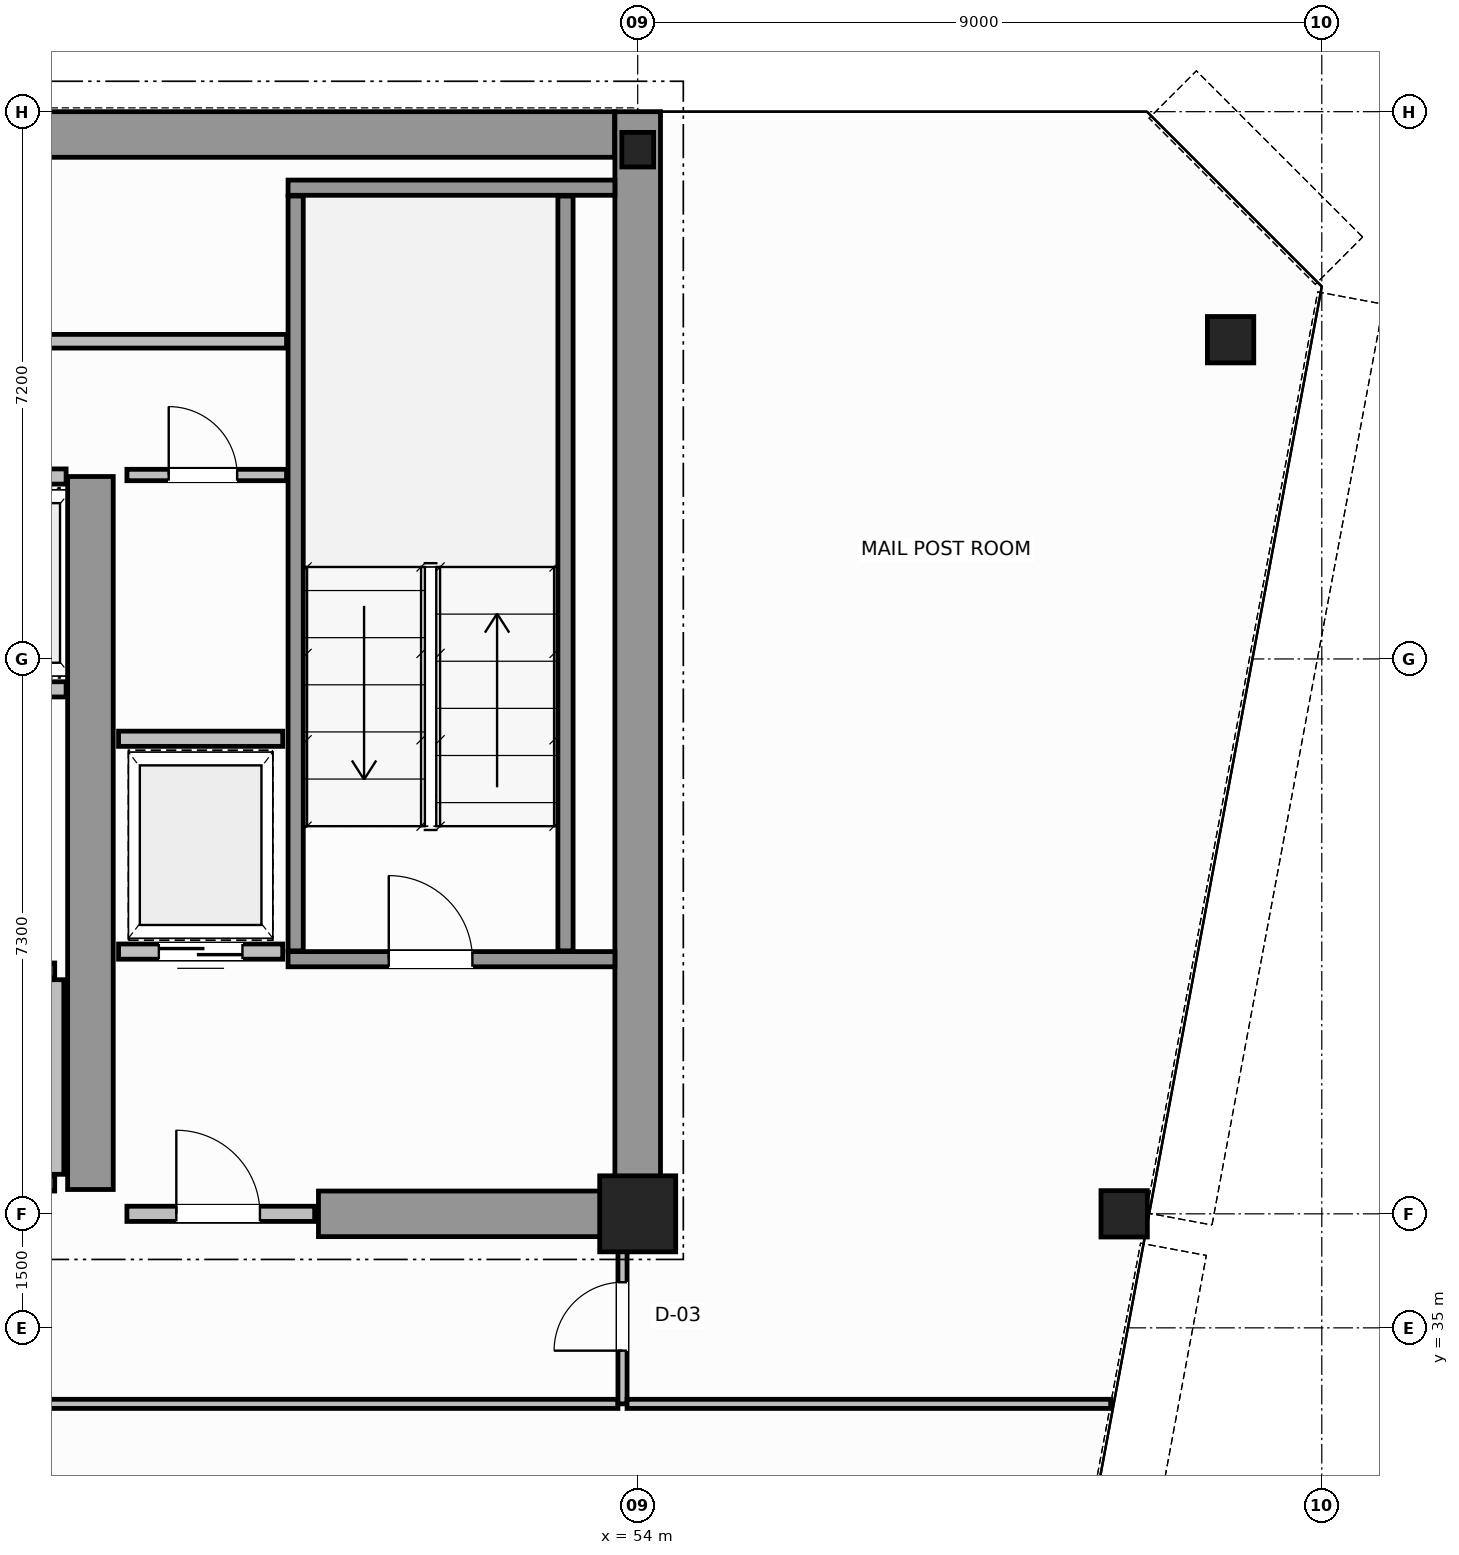
"""IFC4 building model, lengths in metres.
Left out: names, types, materials, properties, quantities, classifications, styles, units other than length and angle.
Written with IfcOpenShell. Run it as: python <this file> out.ifc"""

import sys

from ifc_helpers import new_model, si_unit, direction, frame, frame_2d, origin, origin_2d, place, context, subcontext, project, spatial, rectangle, hollow_circle, i_section, extrude, source, transform, mapped, element, fill, save


model = new_model("IFC4")
c1 = context("Model", 3, precision=1e-05, world=origin(), true_north=direction((0.0, 1.0)))
c2 = subcontext(c1, "Body", "Model", "MODEL_VIEW")
j1 = project(units=[si_unit("LENGTHUNIT", "METRE"), si_unit("PLANEANGLEUNIT", "RADIAN")], contexts=[c1])
p1 = place(None, origin())
s1 = spatial("IfcSite", under=j1, at=p1, CompositionType="ELEMENT")
p2 = place(p1, origin())
s2 = spatial("IfcBuilding", under=s1, at=p2, CompositionType="ELEMENT")
p3 = place(p2, frame((0.0, 0.0, 242.2)))
s3 = spatial("IfcBuildingStorey", under=s2, at=p3, CompositionType="ELEMENT", Elevation=242.2)
m1 = source(origin(), c2, "Body", "SweptSolid", [
    extrude(rectangle(XDim=1.0, YDim=1.0, at=origin_2d()), origin(), (0.0, 0.0, 1.0), 3.8),
])
p4 = place(p3, frame((54.0, 36.5, 0.0), z_axis=(0.0, 0.0, 1.0), x_axis=(1.0, 0.0, 0.0)))
e1 = element("IfcColumn", 1, at=p4, inside=s3, PredefinedType="COLUMN", context=c2, shape_type="MappedRepresentation", body=[
    mapped(m1, transform((0.0, 0.0, 0.0), scale=1.0)),
])
m2 = source(origin(), c2, "Body", "SweptSolid", [
    extrude(i_section(OverallWidth=0.418, OverallDepth=0.455, WebThickness=0.042, FlangeThickness=0.058, FilletRadius=0.015, at=origin_2d()), origin(), (0.0, 0.0, 1.0), 3.8),
])
p5 = place(p3, frame((54.0, 50.5, 0.0), z_axis=(0.0, 0.0, 1.0), x_axis=(1.0, 0.0, 0.0)))
e2 = element("IfcColumn", 2, at=p5, inside=s3, PredefinedType="COLUMN", context=c2, shape_type="MappedRepresentation", body=[
    mapped(m2, transform((0.0, 0.0, 0.0), scale=1.0)),
])
m3 = source(origin(), c2, "Body", "SweptSolid", [
    extrude(hollow_circle(Radius=0.305, WallThickness=0.03, at=origin_2d()), origin(), (0.0, 0.0, 1.0), 3.8),
])
for number, where, z_axis, x_axis in (
    (3, (61.8, 48.0, 0.0), (0.0, 0.0, 1.0), (1.0, 0.0, 0.0)),
    (4, (60.4, 36.5, 0.0), (0.0, 0.0, 1.0), (1.0, 0.0, 0.0)),
):
    element("IfcColumn", number, at=place(p3, frame(where, z_axis=z_axis, x_axis=x_axis)), inside=s3, PredefinedType="COLUMN", context=c2, shape_type="MappedRepresentation", body=[
        mapped(m3, transform((0.0, 0.0, 0.0), scale=1.0)),
    ])
p6 = place(p3, frame((34.002, 50.7, 0.0), z_axis=(0.0, 0.0, 1.0), x_axis=(1.0, 0.0, 0.0)))
e5 = element("IfcWall", 5, at=p6, inside=s3, PredefinedType="SHEAR", context=c2, shape_type="SweptSolid", body=[
    extrude(rectangle(XDim=19.694, YDim=0.6, at=frame_2d((9.847, 0.0))), origin(), (0.0, 0.0, 1.0), 3.8),
])
p7 = place(p3, frame((54.0, 36.5, 0.0), z_axis=(0.0, 0.0, 1.0), x_axis=(0.0, 1.0, 0.0)))
e6 = element("IfcWall", 6, at=p7, inside=s3, PredefinedType="SHEAR", context=c2, shape_type="SweptSolid", body=[
    extrude(rectangle(XDim=14.5, YDim=0.6, at=frame_2d((7.25, 0.0))), origin(), (0.0, 0.0, 1.0), 3.8),
])
p8 = place(p3, frame((49.8, 36.5, 0.0), z_axis=(0.0, 0.0, 1.0), x_axis=(1.0, 0.0, 0.0)))
e7 = element("IfcWall", 7, at=p8, inside=s3, PredefinedType="SHEAR", context=c2, shape_type="SweptSolid", body=[
    extrude(rectangle(XDim=3.88, YDim=0.6, at=frame_2d((1.94, 0.0))), origin(), (0.0, 0.0, 1.0), 2.58),
])
p9 = place(p3, frame((46.8, 36.82, 0.0), z_axis=(0.0, 0.0, 1.0), x_axis=(0.0, 1.0, 0.0)))
e8 = element("IfcWall", 8, at=p9, inside=s3, PredefinedType="SHEAR", context=c2, shape_type="SweptSolid", body=[
    extrude(rectangle(XDim=9.38, YDim=0.6, at=frame_2d((4.69, 0.0))), origin(), (0.0, 0.0, 1.0), 3.8),
])
p10 = place(p3, frame((49.4, 39.85, 0.0), z_axis=(0.0, 0.0, 1.0), x_axis=(1.0, 0.0, 0.0)))
e9 = element("IfcWall", 9, at=p10, inside=s3, PredefinedType="SOLIDWALL", context=c2, shape_type="SweptSolid", body=[
    extrude(rectangle(XDim=4.3, YDim=0.2, at=frame_2d((2.15, 0.0))), origin(), (0.0, 0.0, 1.0), 3.8),
])
p11 = place(p10, frame((1.325, 0.0, 0.0)))
e10 = element("IfcOpeningElement", 10, at=p11, cuts=e9, PredefinedType="OPENING", context=c2, shape_type="SweptSolid", body=[
    extrude(rectangle(XDim=1.1, YDim=2.15, at=frame_2d((0.55, 1.075))), frame((0.0, 0.11, 0.0), z_axis=(0.0, -1.0, 0.0), x_axis=(1.0, 0.0, 0.0)), (0.0, 0.0, 1.0), 0.22),
])
p12 = place(p3, frame((49.4, 50.0, 0.0), z_axis=(0.0, 0.0, 1.0), x_axis=(1.0, 0.0, 0.0)))
e11 = element("IfcWall", 11, at=p12, inside=s3, PredefinedType="SOLIDWALL", context=c2, shape_type="SweptSolid", body=[
    extrude(rectangle(XDim=4.3, YDim=0.2, at=frame_2d((2.15, 0.0))), origin(), (0.0, 0.0, 1.0), 3.8),
])
for number, where, z_axis, x_axis in (
    (12, (49.5, 39.96, 0.0), (0.0, 0.0, 1.0), (0.0, 1.0, 0.0)),
    (13, (53.05, 39.96, 0.0), (0.0, 0.0, 1.0), (0.0, 1.0, 0.0)),
):
    element("IfcWall", number, at=place(p3, frame(where, z_axis=z_axis, x_axis=x_axis)), inside=s3, PredefinedType="SOLIDWALL", context=c2, shape_type="SweptSolid", body=[
        extrude(rectangle(XDim=9.93, YDim=0.2, at=frame_2d((4.965, 0.0))), origin(), (0.0, 0.0, 1.0), 3.8),
    ])
p13 = place(p3, frame((47.28, 36.5, 0.0), z_axis=(0.0, 0.0, 1.0), x_axis=(1.0, 0.0, 0.0)))
e14 = element("IfcWall", 14, at=p13, inside=s3, PredefinedType="SOLIDWALL", context=c2, shape_type="SweptSolid", body=[
    extrude(rectangle(XDim=2.47, YDim=0.2, at=frame_2d((1.235, 0.0))), origin(), (0.0, 0.0, 1.0), 2.57),
])
p14 = place(p13, frame((0.65, 0.0, 0.0)))
e15 = element("IfcOpeningElement", 15, at=p14, cuts=e14, PredefinedType="OPENING", context=c2, shape_type="SweptSolid", body=[
    extrude(rectangle(XDim=1.1, YDim=2.15, at=frame_2d((0.55, 1.075))), frame((0.0, 0.11, 0.0), z_axis=(0.0, -1.0, 0.0), x_axis=(1.0, 0.0, 0.0)), (0.0, 0.0, 1.0), 0.22),
])
p15 = place(p3, frame((44.37, 39.7, 0.0), z_axis=(0.0, 0.0, 1.0), x_axis=(1.0, 0.0, 0.0)))
e16 = element("IfcWall", 16, at=p15, inside=s3, PredefinedType="SOLIDWALL", context=c2, shape_type="SweptSolid", body=[
    extrude(rectangle(XDim=1.96, YDim=0.2, at=frame_2d((0.98, 0.0))), origin(), (0.0, 0.0, 1.0), 3.58),
])
p16 = place(p15, frame((0.43, 0.0, 0.0)))
e17 = element("IfcOpeningElement", 17, at=p16, cuts=e16, PredefinedType="OPENING", context=c2, shape_type="SweptSolid", body=[
    extrude(rectangle(XDim=1.1, YDim=2.15, at=frame_2d((0.55, 1.075))), frame((0.0, 0.11, 0.0), z_axis=(0.0, -1.0, 0.0), x_axis=(1.0, 0.0, 0.0)), (0.0, 0.0, 1.0), 0.22),
])
p17 = place(p3, frame((44.37, 36.9, 0.0), z_axis=(0.0, 0.0, 1.0), x_axis=(1.0, 0.0, 0.0)))
e18 = element("IfcWall", 18, at=p17, inside=s3, PredefinedType="SOLIDWALL", context=c2, shape_type="SweptSolid", body=[
    extrude(rectangle(XDim=1.96, YDim=0.2, at=frame_2d((0.98, 0.0))), origin(), (0.0, 0.0, 1.0), 2.57),
])
p18 = place(p3, frame((46.35, 37.02, 0.0), z_axis=(0.0, 0.0, 1.0), x_axis=(0.0, 1.0, 0.0)))
e19 = element("IfcWall", 19, at=p18, inside=s3, PredefinedType="SOLIDWALL", context=c2, shape_type="SweptSolid", body=[
    extrude(rectangle(XDim=2.56, YDim=0.2, at=frame_2d((1.28, 0.0))), origin(), (0.0, 0.0, 1.0), 3.58),
])
p19 = place(p3, frame((44.62, 43.4, 0.0), z_axis=(0.0, 0.0, 1.0), x_axis=(1.0, 0.0, 0.0)))
e20 = element("IfcWall", 20, at=p19, inside=s3, PredefinedType="SOLIDWALL", context=c2, shape_type="SweptSolid", body=[
    extrude(rectangle(XDim=1.86, YDim=0.2, at=frame_2d((0.93, 0.0))), origin(), (0.0, 0.0, 1.0), 3.58),
])
p20 = place(p19, frame((0.38, 0.0, 0.0)))
e21 = element("IfcOpeningElement", 21, at=p20, cuts=e20, PredefinedType="OPENING", context=c2, shape_type="SweptSolid", body=[
    extrude(rectangle(XDim=1.1, YDim=2.15, at=frame_2d((0.55, 1.075))), frame((0.0, 0.11, 0.0), z_axis=(0.0, -1.0, 0.0), x_axis=(1.0, 0.0, 0.0)), (0.0, 0.0, 1.0), 0.22),
])
p21 = place(p3, frame((44.62, 46.2, 0.0), z_axis=(0.0, 0.0, 1.0), x_axis=(1.0, 0.0, 0.0)))
e22 = element("IfcWall", 22, at=p21, inside=s3, PredefinedType="SOLIDWALL", context=c2, shape_type="SweptSolid", body=[
    extrude(rectangle(XDim=1.86, YDim=0.2, at=frame_2d((0.93, 0.0))), origin(), (0.0, 0.0, 1.0), 3.58),
])
p22 = place(p3, frame((47.17, 39.95, 0.0), z_axis=(0.0, 0.0, 1.0), x_axis=(1.0, 0.0, 0.0)))
e23 = element("IfcWall", 23, at=p22, inside=s3, PredefinedType="SOLIDWALL", context=c2, shape_type="SweptSolid", body=[
    extrude(rectangle(XDim=2.16, YDim=0.2, at=frame_2d((1.08, 0.0))), origin(), (0.0, 0.0, 1.0), 3.58),
])
p23 = place(p22, frame((0.53, 0.0, 0.0)))
e24 = element("IfcOpeningElement", 24, at=p23, cuts=e23, PredefinedType="OPENING", context=c2, shape_type="SweptSolid", body=[
    extrude(rectangle(XDim=1.1, YDim=2.15, at=frame_2d((0.55, 1.075))), frame((0.0, 0.11, 0.0), z_axis=(0.0, -1.0, 0.0), x_axis=(1.0, 0.0, 0.0)), (0.0, 0.0, 1.0), 0.22),
])
p24 = place(p3, frame((47.17, 42.75, 0.0), z_axis=(0.0, 0.0, 1.0), x_axis=(1.0, 0.0, 0.0)))
e25 = element("IfcWall", 25, at=p24, inside=s3, PredefinedType="SOLIDWALL", context=c2, shape_type="SweptSolid", body=[
    extrude(rectangle(XDim=2.16, YDim=0.2, at=frame_2d((1.08, 0.0))), origin(), (0.0, 0.0, 1.0), 3.58),
])
p25 = place(p3, frame((47.28, 46.22, 0.0), z_axis=(0.0, 0.0, 1.0), x_axis=(1.0, 0.0, 0.0)))
e26 = element("IfcWall", 26, at=p25, inside=s3, PredefinedType="PARTITIONING", context=c2, shape_type="SweptSolid", body=[
    extrude(rectangle(XDim=2.1, YDim=0.15, at=frame_2d((1.05, 0.0))), origin(), (0.0, 0.0, 1.0), 3.58),
])
p26 = place(p25, frame((0.55, 0.0, 0.0)))
e27 = element("IfcOpeningElement", 27, at=p26, cuts=e26, PredefinedType="OPENING", context=c2, shape_type="SweptSolid", body=[
    extrude(rectangle(XDim=0.9, YDim=2.1, at=frame_2d((0.45, 1.05))), frame((0.0, 0.085, 0.0), z_axis=(0.0, -1.0, 0.0), x_axis=(1.0, 0.0, 0.0)), (0.0, 0.0, 1.0), 0.17),
])
p27 = place(p3, frame((40.62, 47.98, 0.0), z_axis=(0.0, 0.0, 1.0), x_axis=(1.0, 0.0, 0.0)))
e28 = element("IfcWall", 28, at=p27, inside=s3, PredefinedType="PLUMBINGWALL", context=c2, shape_type="SweptSolid", body=[
    extrude(rectangle(XDim=8.76, YDim=0.18, at=frame_2d((4.38, 0.0))), origin(), (0.0, 0.0, 1.0), 3.58),
])
p28 = place(p27, frame((3.8, 0.0, 0.0)))
e29 = element("IfcOpeningElement", 29, at=p28, cuts=e28, PredefinedType="OPENING", context=c2, shape_type="SweptSolid", body=[
    extrude(rectangle(XDim=0.9, YDim=2.15, at=frame_2d((0.45, 1.075))), frame((0.0, 0.1, 0.0), z_axis=(0.0, -1.0, 0.0), x_axis=(1.0, 0.0, 0.0)), (0.0, 0.0, 1.0), 0.2),
])
p29 = place(p3, frame((34.06, 34.0, 0.0), z_axis=(0.0, 0.0, 1.0), x_axis=(1.0, 0.0, 0.0)))
e30 = element("IfcWall", 30, at=p29, inside=s3, PredefinedType="PARTITIONING", context=c2, shape_type="SweptSolid", body=[
    extrude(rectangle(XDim=19.68, YDim=0.12, at=frame_2d((9.84, 0.0))), origin(), (0.0, 0.0, 1.0), 3.58),
])
p30 = place(p3, frame((53.8, 34.0, 0.0), z_axis=(0.0, 0.0, 1.0), x_axis=(0.0, 1.0, 0.0)))
e31 = element("IfcWall", 31, at=p30, inside=s3, PredefinedType="PARTITIONING", context=c2, shape_type="SweptSolid", body=[
    extrude(rectangle(XDim=2.44, YDim=0.12, at=frame_2d((1.22, 0.0))), origin(), (0.0, 0.0, 1.0), 3.58),
])
p31 = place(p30, frame((0.7, 0.0, 0.0)))
e32 = element("IfcOpeningElement", 32, at=p31, cuts=e31, PredefinedType="OPENING", context=c2, shape_type="SweptSolid", body=[
    extrude(rectangle(XDim=0.9, YDim=2.15, at=frame_2d((0.45, 1.075))), frame((0.0, 0.07, 0.0), z_axis=(0.0, -1.0, 0.0), x_axis=(1.0, 0.0, 0.0)), (0.0, 0.0, 1.0), 0.14),
])
p32 = place(p3, frame((53.86, 34.0, 0.0), z_axis=(0.0, 0.0, 1.0), x_axis=(1.0, 0.0, 0.0)))
e33 = element("IfcWall", 33, at=p32, inside=s3, PredefinedType="PARTITIONING", context=c2, shape_type="SweptSolid", body=[
    extrude(rectangle(XDim=6.363, YDim=0.12, at=frame_2d((3.181, 0.0))), origin(), (0.0, 0.0, 1.0), 3.58),
])
m4 = source(origin(), c2, "Body", "SweptSolid", [
    extrude(rectangle(XDim=1.1, YDim=2.15, at=frame_2d((0.55, 1.075))), frame((0.0, 0.025, 0.0), z_axis=(0.0, -1.0, 0.0), x_axis=(1.0, 0.0, 0.0)), (0.0, 0.0, 1.0), 0.05),
])
p33 = place(p11, origin())
e34 = element("IfcDoor", 34, at=p33, inside=s3, OperationType="SINGLE_SWING_RIGHT", PredefinedType="DOOR", context=c2, shape_type="MappedRepresentation", body=[
    mapped(m4, transform((0.0, 0.0, 0.0), scale=1.0)),
])
fill(e10, e34)
p34 = place(p14, origin())
e35 = element("IfcDoor", 35, at=p34, inside=s3, OperationType="SINGLE_SWING_LEFT", PredefinedType="DOOR", context=c2, shape_type="MappedRepresentation", body=[
    mapped(m4, transform((0.0, 0.0, 0.0), scale=1.0)),
])
fill(e15, e35)
p35 = place(p23, origin())
e36 = element("IfcDoor", 36, at=p35, inside=s3, OperationType="DOUBLE_DOOR_SLIDING", PredefinedType="DOOR", context=c2, shape_type="MappedRepresentation", body=[
    mapped(m4, transform((0.0, 0.0, 0.0), scale=1.0)),
])
fill(e24, e36)
m5 = source(origin(), c2, "Body", "SweptSolid", [
    extrude(rectangle(XDim=0.9, YDim=2.1, at=frame_2d((0.45, 1.05))), frame((0.0, 0.025, 0.0), z_axis=(0.0, -1.0, 0.0), x_axis=(1.0, 0.0, 0.0)), (0.0, 0.0, 1.0), 0.05),
])
p36 = place(p26, origin())
e37 = element("IfcDoor", 37, at=p36, inside=s3, OperationType="SINGLE_SWING_RIGHT", PredefinedType="DOOR", context=c2, shape_type="MappedRepresentation", body=[
    mapped(m5, transform((0.0, 0.0, 0.0), scale=1.0)),
])
fill(e27, e37)
m6 = source(origin(), c2, "Body", "SweptSolid", [
    extrude(rectangle(XDim=0.9, YDim=2.15, at=frame_2d((0.45, 1.075))), frame((0.0, 0.025, 0.0), z_axis=(0.0, -1.0, 0.0), x_axis=(1.0, 0.0, 0.0)), (0.0, 0.0, 1.0), 0.05),
])
p37 = place(p31, origin())
e38 = element("IfcDoor", 38, at=p37, inside=s3, OperationType="SINGLE_SWING_RIGHT", PredefinedType="DOOR", context=c2, shape_type="MappedRepresentation", body=[
    mapped(m6, transform((0.0, 0.0, 0.0), scale=1.0)),
])
fill(e32, e38)
save(model, sys.argv[1])
